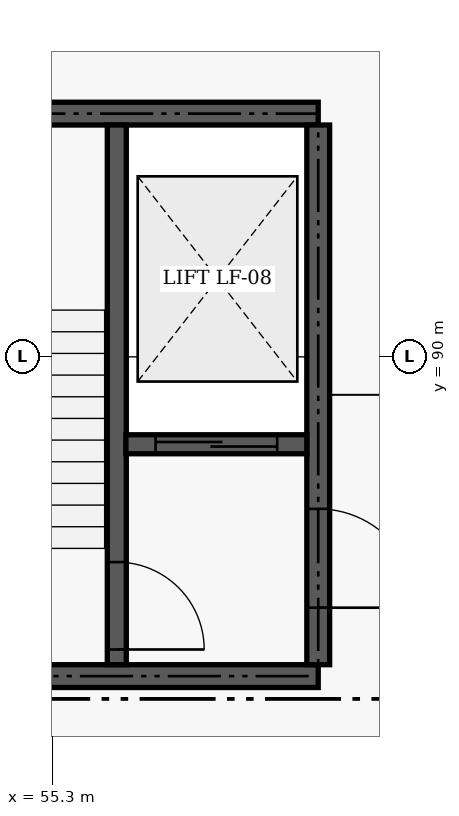
"""IFC4 building model, lengths in metres.
Left out: names, types, materials, properties, quantities, classifications, styles, units other than length and angle.
Written with IfcOpenShell. Run it as: python <this file> out.ifc"""

import sys

from ifc_helpers import new_model, si_unit, direction, frame, frame_2d, origin, place, context, subcontext, project, spatial, rectangle, extrude, element, fill, save


model = new_model("IFC4")
c1 = context("Model", 3, precision=1e-05, world=origin(), true_north=direction((0.0, 1.0)))
c2 = subcontext(c1, "Body", "Model", "MODEL_VIEW")
j1 = project(units=[si_unit("LENGTHUNIT", "METRE"), si_unit("PLANEANGLEUNIT", "RADIAN")], contexts=[c1])
p1 = place(None, origin())
s1 = spatial("IfcSite", under=j1, at=p1, CompositionType="ELEMENT")
p2 = place(p1, origin())
s2 = spatial("IfcBuilding", under=s1, at=p2, CompositionType="ELEMENT")
p3 = place(p2, frame((0.0, 0.0, 5.4)))
s3 = spatial("IfcBuildingStorey", under=s2, at=p3, CompositionType="ELEMENT", Elevation=5.4)
for number, where, z_axis, x_axis in (
    (1, (52.2, 85.8, 0.0), (0.0, 0.0, 1.0), (1.0, 0.0, 0.0)),
    (2, (52.2, 93.2, 0.0), (0.0, 0.0, 1.0), (1.0, 0.0, 0.0)),
):
    element("IfcWall", number, at=place(p3, frame(where, z_axis=z_axis, x_axis=x_axis)), inside=s3, PredefinedType="SHEAR", context=c2, shape_type="SweptSolid", body=[
        extrude(rectangle(XDim=6.6, YDim=0.3, at=frame_2d((3.3, 0.0))), origin(), (0.0, 0.0, 1.0), 4.2),
    ])
p4 = place(p3, frame((58.8, 85.95, 0.0), z_axis=(0.0, 0.0, 1.0), x_axis=(0.0, 1.0, 0.0)))
e3 = element("IfcWall", 3, at=p4, inside=s3, PredefinedType="SHEAR", context=c2, shape_type="SweptSolid", body=[
    extrude(rectangle(XDim=7.1, YDim=0.3, at=frame_2d((3.55, 0.0))), origin(), (0.0, 0.0, 1.0), 4.2),
])
p5 = place(p4, frame((0.75, 0.0, 0.0)))
e4 = element("IfcOpeningElement", 4, at=p5, cuts=e3, PredefinedType="OPENING", context=c2, shape_type="SweptSolid", body=[
    extrude(rectangle(XDim=1.3, YDim=2.15, at=frame_2d((0.65, 1.075))), frame((0.0, 0.16, 0.0), z_axis=(0.0, -1.0, 0.0), x_axis=(1.0, 0.0, 0.0)), (0.0, 0.0, 1.0), 0.32),
])
p6 = place(p3, frame((56.15, 85.95, 0.0), z_axis=(0.0, 0.0, 1.0), x_axis=(0.0, 1.0, 0.0)))
e5 = element("IfcWall", 5, at=p6, inside=s3, PredefinedType="SHEAR", context=c2, shape_type="SweptSolid", body=[
    extrude(rectangle(XDim=7.1, YDim=0.25, at=frame_2d((3.55, 0.0))), origin(), (0.0, 0.0, 1.0), 4.2),
])
p7 = place(p6, frame((0.2, 0.0, 0.0)))
e6 = element("IfcOpeningElement", 6, at=p7, cuts=e5, PredefinedType="OPENING", context=c2, shape_type="SweptSolid", body=[
    extrude(rectangle(XDim=1.15, YDim=2.15, at=frame_2d((0.575, 1.075))), frame((0.0, 0.135, 0.0), z_axis=(0.0, -1.0, 0.0), x_axis=(1.0, 0.0, 0.0)), (0.0, 0.0, 1.0), 0.27),
])
p8 = place(p3, frame((56.27, 88.85, 0.0), z_axis=(0.0, 0.0, 1.0), x_axis=(1.0, 0.0, 0.0)))
e7 = element("IfcWall", 7, at=p8, inside=s3, PredefinedType="SHEAR", context=c2, shape_type="SweptSolid", body=[
    extrude(rectangle(XDim=2.38, YDim=0.25, at=frame_2d((1.19, 0.0))), origin(), (0.0, 0.0, 1.0), 4.2),
])
p9 = place(p8, frame((0.39, 0.0, 0.0)))
e8 = element("IfcOpeningElement", 8, at=p9, cuts=e7, PredefinedType="OPENING", context=c2, shape_type="SweptSolid", body=[
    extrude(rectangle(XDim=1.6, YDim=2.3, at=frame_2d((0.8, 1.15))), frame((0.0, 0.135, 0.0), z_axis=(0.0, -1.0, 0.0), x_axis=(1.0, 0.0, 0.0)), (0.0, 0.0, 1.0), 0.27),
])
p10 = place(p5, frame((1.3, 0.0, 0.0), z_axis=(0.0, 0.0, 1.0), x_axis=(-1.0, 0.0, 0.0)))
e9 = element("IfcDoor", 9, at=p10, inside=s3, OperationType="DOUBLE_DOOR_SINGLE_SWING", PredefinedType="DOOR", context=c2, shape_type="SweptSolid", body=[
    extrude(rectangle(XDim=1.3, YDim=2.15, at=frame_2d((0.65, 1.075))), frame((0.0, 0.025, 0.0), z_axis=(0.0, -1.0, 0.0), x_axis=(1.0, 0.0, 0.0)), (0.0, 0.0, 1.0), 0.05),
])
fill(e4, e9)
p11 = place(p7, frame((1.15, 0.0, 0.0), z_axis=(0.0, 0.0, 1.0), x_axis=(-1.0, 0.0, 0.0)))
e10 = element("IfcDoor", 10, at=p11, inside=s3, OperationType="SINGLE_SWING_LEFT", PredefinedType="DOOR", context=c2, shape_type="SweptSolid", body=[
    extrude(rectangle(XDim=1.15, YDim=2.15, at=frame_2d((0.575, 1.075))), frame((0.0, 0.025, 0.0), z_axis=(0.0, -1.0, 0.0), x_axis=(1.0, 0.0, 0.0)), (0.0, 0.0, 1.0), 0.05),
])
fill(e6, e10)
p12 = place(p9, origin())
e11 = element("IfcDoor", 11, at=p12, inside=s3, OperationType="SLIDING_TO_LEFT", PredefinedType="DOOR", context=c2, shape_type="SweptSolid", body=[
    extrude(rectangle(XDim=1.6, YDim=2.3, at=frame_2d((0.8, 1.15))), frame((0.0, 0.025, 0.0), z_axis=(0.0, -1.0, 0.0), x_axis=(1.0, 0.0, 0.0)), (0.0, 0.0, 1.0), 0.05),
])
fill(e8, e11)
save(model, sys.argv[1])
